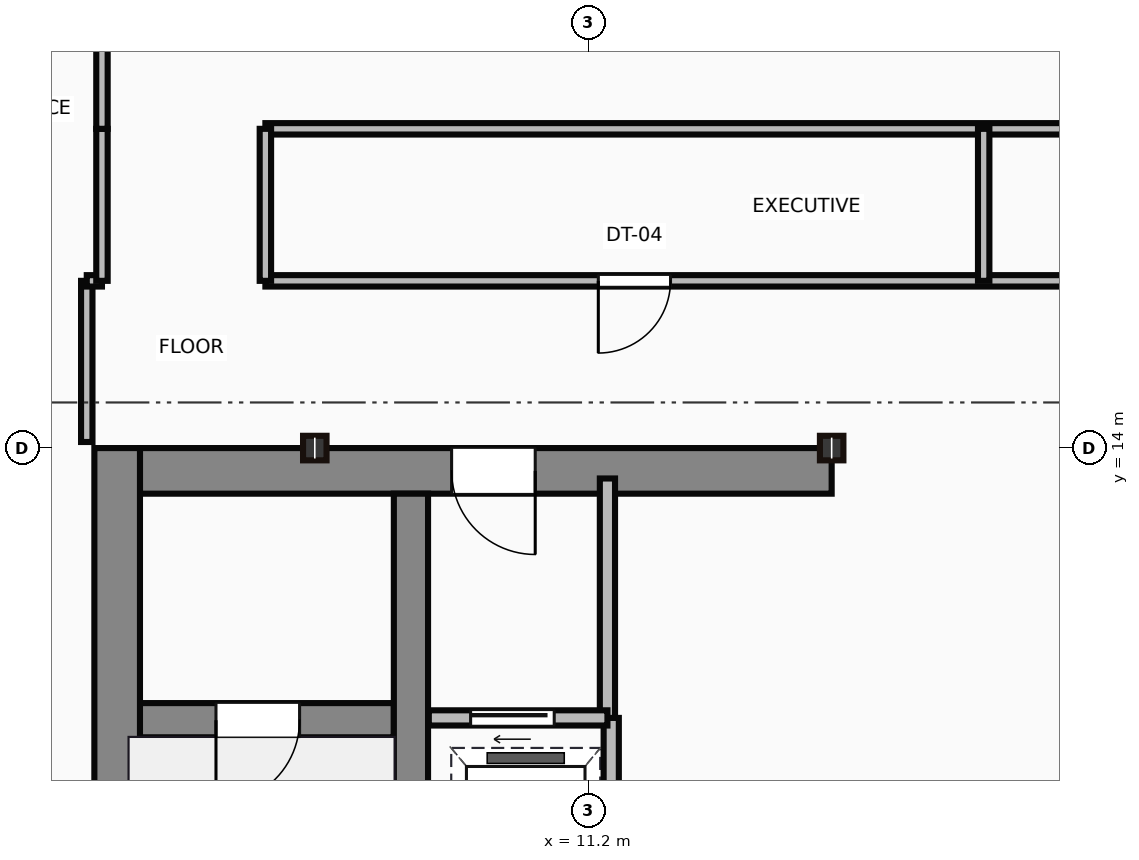
"""IFC4 building model, lengths in metres.
Left out: names, types, materials, properties, quantities, classifications, styles, units other than length and angle.
Written with IfcOpenShell. Run it as: python <this file> out.ifc"""

import sys

from ifc_helpers import new_model, si_unit, direction, frame, frame_2d, origin, origin_2d, place, context, subcontext, project, spatial, rectangle, i_section, extrude, source, transform, mapped, element, fill, save


model = new_model("IFC4")
c1 = context("Model", 3, precision=1e-05, world=origin(), true_north=direction((0.0, 1.0)))
c2 = subcontext(c1, "Body", "Model", "MODEL_VIEW")
j1 = project(units=[si_unit("LENGTHUNIT", "METRE"), si_unit("PLANEANGLEUNIT", "RADIAN")], contexts=[c1])
p1 = place(None, origin())
s1 = spatial("IfcSite", under=j1, at=p1, CompositionType="ELEMENT")
p2 = place(p1, origin())
s2 = spatial("IfcBuilding", under=s1, at=p2, CompositionType="ELEMENT")
p3 = place(p2, frame((0.0, 0.0, 284.35)))
s3 = spatial("IfcBuildingStorey", under=s2, at=p3, CompositionType="ELEMENT", Elevation=284.35)
m1 = source(origin(), c2, "Body", "SweptSolid", [
    extrude(rectangle(XDim=13.1, YDim=0.6, at=frame_2d((6.55, 0.0))), origin(), (0.0, 0.0, 1.0), 3.65),
])
p4 = place(p3, frame((5.0, 0.9, 0.0), z_axis=(0.0, 0.0, 1.0), x_axis=(0.0, 1.0, 0.0)))
e1 = element("IfcWall", 1, at=p4, inside=s3, PredefinedType="SHEAR", context=c2, shape_type="MappedRepresentation", body=[
    mapped(m1, transform((0.0, 0.0, 0.0))),
])
m2 = source(origin(), c2, "Body", "SweptSolid", [
    extrude(rectangle(XDim=9.1, YDim=0.6, at=frame_2d((4.55, 0.0))), origin(), (0.0, 0.0, 1.0), 3.65),
])
p5 = place(p3, frame((5.3, 13.7, 0.0), z_axis=(0.0, 0.0, 1.0), x_axis=(1.0, 0.0, 0.0)))
e2 = element("IfcWall", 2, at=p5, inside=s3, PredefinedType="SHEAR", context=c2, shape_type="MappedRepresentation", body=[
    mapped(m2, transform((0.0, 0.0, 0.0))),
])
p6 = place(p5, frame((4.1, 0.0, 0.0)))
e3 = element("IfcOpeningElement", 3, at=p6, cuts=e2, PredefinedType="OPENING", context=c2, shape_type="SweptSolid", body=[
    extrude(rectangle(XDim=1.1, YDim=2.15, at=frame_2d((0.55, 1.075))), frame((0.0, 0.31, 0.0), z_axis=(0.0, -1.0, 0.0), x_axis=(1.0, 0.0, 0.0)), (0.0, 0.0, 1.0), 0.62),
])
m3 = source(origin(), c2, "Body", "SweptSolid", [
    extrude(rectangle(XDim=12.5, YDim=0.45, at=frame_2d((6.25, 0.0))), origin(), (0.0, 0.0, 1.0), 3.65),
])
p7 = place(p3, frame((8.865, 0.9, 0.0), z_axis=(0.0, 0.0, 1.0), x_axis=(0.0, 1.0, 0.0)))
e4 = element("IfcWall", 4, at=p7, inside=s3, PredefinedType="SHEAR", context=c2, shape_type="MappedRepresentation", body=[
    mapped(m3, transform((0.0, 0.0, 0.0))),
])
m4 = source(origin(), c2, "Body", "SweptSolid", [
    extrude(rectangle(XDim=3.39, YDim=0.45, at=frame_2d((1.695, 0.0))), origin(), (0.0, 0.0, 1.0), 3.65),
])
p8 = place(p3, frame((5.25, 10.42, 0.0), z_axis=(0.0, 0.0, 1.0), x_axis=(1.0, 0.0, 0.0)))
e5 = element("IfcWall", 5, at=p8, inside=s3, PredefinedType="SHEAR", context=c2, shape_type="MappedRepresentation", body=[
    mapped(m4, transform((0.0, 0.0, 0.0))),
])
p9 = place(p8, frame((1.05, 0.0, 0.0)))
e6 = element("IfcOpeningElement", 6, at=p9, cuts=e5, PredefinedType="OPENING", context=c2, shape_type="SweptSolid", body=[
    extrude(rectangle(XDim=1.1, YDim=2.15, at=frame_2d((0.55, 1.075))), frame((0.0, 0.235, 0.0), z_axis=(0.0, -1.0, 0.0), x_axis=(1.0, 0.0, 0.0)), (0.0, 0.0, 1.0), 0.47),
])
m5 = source(origin(), c2, "Body", "SweptSolid", [
    extrude(i_section(OverallWidth=0.309, OverallDepth=0.323, WebThickness=0.014, FlangeThickness=0.023, at=origin_2d()), origin(), (0.0, 0.0, 1.0), 3.65),
])
for number, where, z_axis, x_axis in (
    (7, (7.6, 14.0, 0.0), (0.0, 0.0, 1.0), (1.0, 0.0, 0.0)),
    (8, (14.4, 14.0, 0.0), (0.0, 0.0, 1.0), (1.0, 0.0, 0.0)),
):
    element("IfcColumn", number, at=place(p3, frame(where, z_axis=z_axis, x_axis=x_axis)), inside=s3, PredefinedType="COLUMN", context=c2, shape_type="MappedRepresentation", body=[
        mapped(m5, transform((0.0, 0.0, 0.0))),
    ])
m6 = source(origin(), c2, "Body", "SweptSolid", [
    extrude(rectangle(XDim=3.18, YDim=0.2, at=frame_2d((1.59, 0.0))), origin(), (0.0, 0.0, 1.0), 3.4),
])
p10 = place(p3, frame((11.45, 10.42, 0.0), z_axis=(0.0, 0.0, 1.0), x_axis=(0.0, 1.0, 0.0)))
e9 = element("IfcWall", 9, at=p10, inside=s3, PredefinedType="PARTITIONING", context=c2, shape_type="MappedRepresentation", body=[
    mapped(m6, transform((0.0, 0.0, 0.0))),
])
m7 = source(origin(), c2, "Body", "SweptSolid", [
    extrude(rectangle(XDim=2.35, YDim=0.2, at=frame_2d((1.175, 0.0))), origin(), (0.0, 0.0, 1.0), 3.4),
])
p11 = place(p3, frame((9.1, 10.45, 0.0), z_axis=(0.0, 0.0, 1.0), x_axis=(1.0, 0.0, 0.0)))
e10 = element("IfcWall", 10, at=p11, inside=s3, PredefinedType="PARTITIONING", context=c2, shape_type="MappedRepresentation", body=[
    mapped(m7, transform((0.0, 0.0, 0.0))),
])
p12 = place(p11, frame((0.55, 0.0, 0.0)))
e11 = element("IfcOpeningElement", 11, at=p12, cuts=e10, PredefinedType="OPENING", context=c2, shape_type="SweptSolid", body=[
    extrude(rectangle(XDim=1.1, YDim=2.15, at=frame_2d((0.55, 1.075))), frame((0.0, 0.11, 0.0), z_axis=(0.0, -1.0, 0.0), x_axis=(1.0, 0.0, 0.0)), (0.0, 0.0, 1.0), 0.22),
])
m8 = source(origin(), c2, "Body", "SweptSolid", [
    extrude(rectangle(XDim=9.6, YDim=0.2, at=frame_2d((4.8, 0.0))), origin(), (0.0, 0.0, 1.0), 3.4),
])
p13 = place(p3, frame((11.5, 0.85, 0.0), z_axis=(0.0, 0.0, 1.0), x_axis=(0.0, 1.0, 0.0)))
e12 = element("IfcWall", 12, at=p13, inside=s3, PredefinedType="PARTITIONING", context=c2, shape_type="MappedRepresentation", body=[
    mapped(m8, transform((0.0, 0.0, 0.0))),
])
p14 = place(p13, frame((4.2, 0.0, 0.0)))
e13 = element("IfcOpeningElement", 13, at=p14, cuts=e12, PredefinedType="OPENING", context=c2, shape_type="SweptSolid", body=[
    extrude(rectangle(XDim=1.1, YDim=2.15, at=frame_2d((0.55, 1.075))), frame((0.0, 0.11, 0.0), z_axis=(0.0, -1.0, 0.0), x_axis=(1.0, 0.0, 0.0)), (0.0, 0.0, 1.0), 0.22),
])
p15 = place(p13, frame((0.9, 0.0, 0.0)))
e14 = element("IfcOpeningElement", 14, at=p15, cuts=e12, PredefinedType="OPENING", context=c2, shape_type="SweptSolid", body=[
    extrude(rectangle(XDim=1.2, YDim=2.15, at=frame_2d((0.6, 1.075))), frame((0.0, 0.11, 0.0), z_axis=(0.0, -1.0, 0.0), x_axis=(1.0, 0.0, 0.0)), (0.0, 0.0, 1.0), 0.22),
])
m9 = source(origin(), c2, "Body", "SweptSolid", [
    extrude(rectangle(XDim=2.12, YDim=0.15, at=frame_2d((1.06, 0.0))), origin(), (0.0, 0.0, 1.0), 3.4),
])
p16 = place(p3, frame((4.6, 14.08, 0.0), z_axis=(0.0, 0.0, 1.0), x_axis=(0.0, 1.0, 0.0)))
e15 = element("IfcWall", 15, at=p16, inside=s3, PredefinedType="PARTITIONING", context=c2, shape_type="MappedRepresentation", body=[
    mapped(m9, transform((0.0, 0.0, 0.0))),
])
m10 = source(origin(), c2, "Body", "SweptSolid", [
    extrude(rectangle(XDim=0.2, YDim=0.15, at=frame_2d((0.1, 0.0))), origin(), (0.0, 0.0, 1.0), 3.4),
])
p17 = place(p3, frame((4.6, 16.2, 0.0), z_axis=(0.0, 0.0, 1.0), x_axis=(1.0, 0.0, 0.0)))
e16 = element("IfcWall", 16, at=p17, inside=s3, PredefinedType="PARTITIONING", context=c2, shape_type="MappedRepresentation", body=[
    mapped(m10, transform((0.0, 0.0, 0.0))),
])
m11 = source(origin(), c2, "Body", "SweptSolid", [
    extrude(rectangle(XDim=2.0, YDim=0.15, at=frame_2d((1.0, 0.0))), origin(), (0.0, 0.0, 1.0), 3.4),
])
for number, where, z_axis, x_axis in (
    (17, (4.8, 16.2, 0.0), (0.0, 0.0, 1.0), (0.0, 1.0, 0.0)),
    (18, (4.8, 18.2, 0.0), (0.0, 0.0, 1.0), (0.0, 1.0, 0.0)),
):
    element("IfcWall", number, at=place(p3, frame(where, z_axis=z_axis, x_axis=x_axis)), inside=s3, PredefinedType="PARTITIONING", context=c2, shape_type="MappedRepresentation", body=[
        mapped(m11, transform((0.0, 0.0, 0.0))),
    ])
m12 = source(origin(), c2, "Body", "SweptSolid", [
    extrude(rectangle(XDim=23.25, YDim=0.15, at=frame_2d((11.625, 0.0))), origin(), (0.0, 0.0, 1.0), 3.4),
])
p18 = place(p3, frame((6.95, 16.2, 0.0), z_axis=(0.0, 0.0, 1.0), x_axis=(1.0, 0.0, 0.0)))
e19 = element("IfcWall", 19, at=p18, inside=s3, PredefinedType="PARTITIONING", context=c2, shape_type="MappedRepresentation", body=[
    mapped(m12, transform((0.0, 0.0, 0.0))),
])
p19 = place(p18, frame((4.38, 0.0, 0.0)))
e20 = element("IfcOpeningElement", 20, at=p19, cuts=e19, PredefinedType="OPENING", context=c2, shape_type="SweptSolid", body=[
    extrude(rectangle(XDim=0.95, YDim=2.15, at=frame_2d((0.475, 1.075))), frame((0.0, 0.085, 0.0), z_axis=(0.0, -1.0, 0.0), x_axis=(1.0, 0.0, 0.0)), (0.0, 0.0, 1.0), 0.17),
])
p20 = place(p18, frame((15.745, 0.0, 0.0)))
e21 = element("IfcOpeningElement", 21, at=p20, cuts=e19, PredefinedType="OPENING", context=c2, shape_type="SweptSolid", body=[
    extrude(rectangle(XDim=0.95, YDim=2.15, at=frame_2d((0.475, 1.075))), frame((0.0, 0.085, 0.0), z_axis=(0.0, -1.0, 0.0), x_axis=(1.0, 0.0, 0.0)), (0.0, 0.0, 1.0), 0.17),
])
p21 = place(p3, frame((30.2, 18.2, 0.0), z_axis=(0.0, 0.0, 1.0), x_axis=(-1.0, 0.0, 0.0)))
e22 = element("IfcWall", 22, at=p21, inside=s3, PredefinedType="PARTITIONING", context=c2, shape_type="MappedRepresentation", body=[
    mapped(m12, transform((0.0, 0.0, 0.0))),
])
for number, where, z_axis, x_axis in (
    (23, (6.95, 18.2, 0.0), (0.0, 0.0, 1.0), (0.0, -1.0, 0.0)),
    (24, (16.4, 18.2, 0.0), (0.0, 0.0, 1.0), (0.0, -1.0, 0.0)),
):
    element("IfcWall", number, at=place(p3, frame(where, z_axis=z_axis, x_axis=x_axis)), inside=s3, PredefinedType="PARTITIONING", context=c2, shape_type="MappedRepresentation", body=[
        mapped(m11, transform((0.0, 0.0, 0.0))),
    ])
m13 = source(origin(), c2, "Body", "SweptSolid", [
    extrude(rectangle(XDim=1.1, YDim=2.15, at=frame_2d((0.55, 1.075))), frame((0.0, 0.025, 0.0), z_axis=(0.0, -1.0, 0.0), x_axis=(1.0, 0.0, 0.0)), (0.0, 0.0, 1.0), 0.05),
])
p22 = place(p9, frame((1.1, 0.0, 0.0), z_axis=(0.0, 0.0, 1.0), x_axis=(-1.0, 0.0, 0.0)))
e25 = element("IfcDoor", 25, at=p22, inside=s3, OperationType="SINGLE_SWING_LEFT", PredefinedType="DOOR", context=c2, shape_type="MappedRepresentation", body=[
    mapped(m13, transform((0.0, 0.0, 0.0))),
])
fill(e6, e25)
p23 = place(p6, origin())
e26 = element("IfcDoor", 26, at=p23, inside=s3, OperationType="SINGLE_SWING_RIGHT", PredefinedType="DOOR", context=c2, shape_type="MappedRepresentation", body=[
    mapped(m13, transform((0.0, 0.0, 0.0))),
])
fill(e3, e26)
p24 = place(p12, origin())
e27 = element("IfcDoor", 27, at=p24, inside=s3, OperationType="SLIDING_TO_LEFT", PredefinedType="DOOR", context=c2, shape_type="MappedRepresentation", body=[
    mapped(m13, transform((0.0, 0.0, 0.0))),
])
fill(e11, e27)
m14 = source(origin(), c2, "Body", "SweptSolid", [
    extrude(rectangle(XDim=0.95, YDim=2.15, at=frame_2d((0.475, 1.075))), frame((0.0, 0.025, 0.0), z_axis=(0.0, -1.0, 0.0), x_axis=(1.0, 0.0, 0.0)), (0.0, 0.0, 1.0), 0.05),
])
p25 = place(p19, origin())
e28 = element("IfcDoor", 28, at=p25, inside=s3, OperationType="SINGLE_SWING_LEFT", PredefinedType="DOOR", context=c2, shape_type="MappedRepresentation", body=[
    mapped(m14, transform((0.0, 0.0, 0.0))),
])
fill(e20, e28)
save(model, sys.argv[1])
